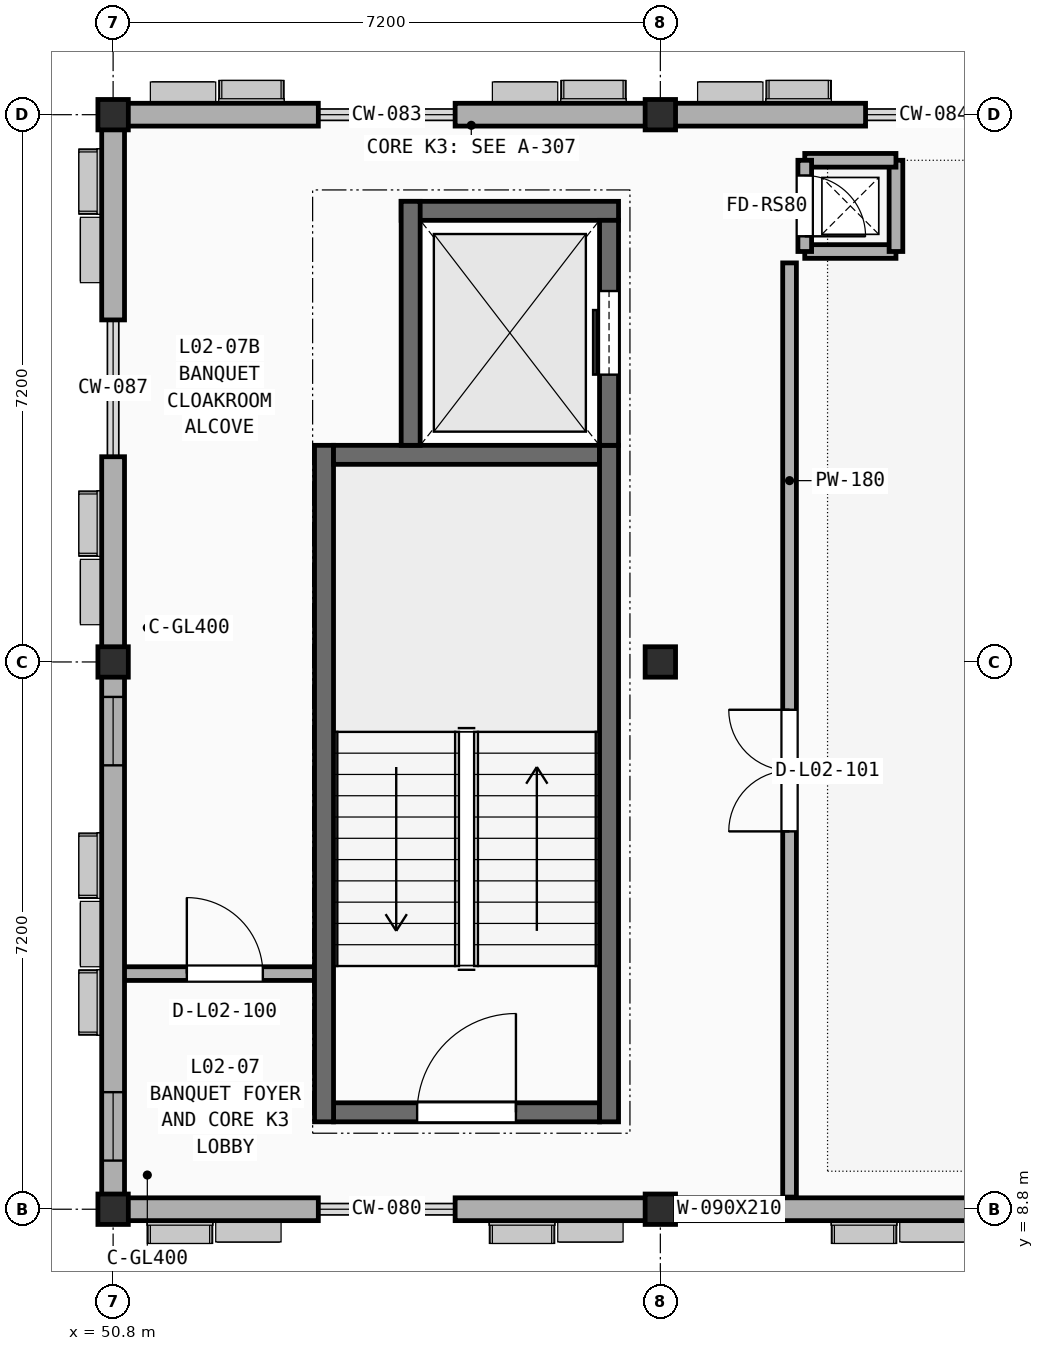
"""IFC4 building model, lengths in metres.
Left out: names, types, materials, properties, quantities, classifications, styles, units other than length and angle.
Written with IfcOpenShell. Run it as: python <this file> out.ifc"""

import sys

from ifc_helpers import new_model, si_unit, direction, frame, frame_2d, origin, origin_2d, place, context, subcontext, project, spatial, rectangle, extrude, element, fill, save


model = new_model("IFC4")
c1 = context("Model", 3, precision=1e-05, world=origin(), true_north=direction((0.0, 1.0)))
c2 = subcontext(c1, "Body", "Model", "MODEL_VIEW")
j1 = project(units=[si_unit("LENGTHUNIT", "METRE"), si_unit("PLANEANGLEUNIT", "RADIAN")], contexts=[c1])
p1 = place(None, origin())
s1 = spatial("IfcSite", under=j1, at=p1, CompositionType="ELEMENT")
p2 = place(p1, origin())
s2 = spatial("IfcBuilding", under=s1, at=p2, CompositionType="ELEMENT")
p3 = place(p2, frame((0.0, 0.0, 9.6)))
s3 = spatial("IfcBuildingStorey", under=s2, at=p3, CompositionType="ELEMENT", Elevation=9.6)
for number, where, z_axis, x_axis in (
    (1, (50.8, 8.8, 0.0), (0.0, 0.0, 1.0), (1.0, 0.0, 0.0)),
    (2, (50.8, 16.0, 0.0), (0.0, 0.0, 1.0), (1.0, 0.0, 0.0)),
    (3, (50.8, 23.2, 0.0), (0.0, 0.0, 1.0), (1.0, 0.0, 0.0)),
    (4, (58.0, 8.8, 0.0), (0.0, 0.0, 1.0), (1.0, 0.0, 0.0)),
    (5, (58.0, 16.0, 0.0), (0.0, 0.0, 1.0), (1.0, 0.0, 0.0)),
    (6, (58.0, 23.2, 0.0), (0.0, 0.0, 1.0), (1.0, 0.0, 0.0)),
):
    element("IfcColumn", number, at=place(p3, frame(where, z_axis=z_axis, x_axis=x_axis)), inside=s3, PredefinedType="COLUMN", context=c2, shape_type="SweptSolid", body=[
        extrude(rectangle(XDim=0.4, YDim=0.4, at=origin_2d()), origin(), (0.0, 0.0, 1.0), 4.2),
    ])
p4 = place(p3, frame((50.94, 11.9, 0.0), z_axis=(0.0, 0.0, 1.0), x_axis=(1.0, 0.0, 0.0)))
e7 = element("IfcWall", 7, at=p4, inside=s3, PredefinedType="PARTITIONING", context=c2, shape_type="SweptSolid", body=[
    extrude(rectangle(XDim=2.66, YDim=0.18, at=frame_2d((1.33, 0.0))), origin(), (0.0, 0.0, 1.0), 3.45),
])
p5 = place(p4, frame((0.83, 0.0, -0.01)))
e8 = element("IfcOpeningElement", 8, at=p5, cuts=e7, PredefinedType="OPENING", context=c2, shape_type="SweptSolid", body=[
    extrude(rectangle(XDim=1.0, YDim=2.16, at=frame_2d((0.5, 1.08))), frame((0.0, 0.1, 0.0), z_axis=(0.0, -1.0, 0.0), x_axis=(1.0, 0.0, 0.0)), (0.0, 0.0, 1.0), 0.2),
])
p6 = place(p3, frame((59.7, 8.96, 0.0), z_axis=(0.0, 0.0, 1.0), x_axis=(0.0, 1.0, 0.0)))
e9 = element("IfcWall", 9, at=p6, inside=s3, PredefinedType="PARTITIONING", context=c2, shape_type="SweptSolid", body=[
    extrude(rectangle(XDim=12.29, YDim=0.18, at=frame_2d((6.145, 0.0))), origin(), (0.0, 0.0, 1.0), 3.37),
])
p7 = place(p6, frame((4.811, 0.0, -0.01)))
e10 = element("IfcOpeningElement", 10, at=p7, cuts=e9, PredefinedType="OPENING", context=c2, shape_type="SweptSolid", body=[
    extrude(rectangle(XDim=1.6, YDim=2.21, at=frame_2d((0.8, 1.105))), frame((0.0, 0.1, 0.0), z_axis=(0.0, -1.0, 0.0), x_axis=(1.0, 0.0, 0.0)), (0.0, 0.0, 1.0), 0.2),
])
for number, where, z_axis, x_axis in (
    (11, (50.8, 8.8, 0.0), (0.0, 0.0, 1.0), (1.0, 0.0, 0.0)),
    (12, (55.3, 8.8, 0.0), (0.0, 0.0, 1.0), (1.0, 0.0, 0.0)),
):
    element("IfcWall", number, at=place(p3, frame(where, z_axis=z_axis, x_axis=x_axis)), inside=s3, PredefinedType="SOLIDWALL", context=c2, shape_type="SweptSolid", body=[
        extrude(rectangle(XDim=2.7, YDim=0.3, at=frame_2d((1.35, 0.0))), origin(), (0.0, 0.0, 1.0), 3.37),
    ])
p8 = place(p3, frame((58.0, 8.8, 0.0), z_axis=(0.0, 0.0, 1.0), x_axis=(1.0, 0.0, 0.0)))
e13 = element("IfcWall", 13, at=p8, inside=s3, PredefinedType="SOLIDWALL", context=c2, shape_type="SweptSolid", body=[
    extrude(rectangle(XDim=7.2, YDim=0.3, at=frame_2d((3.6, 0.0))), origin(), (0.0, 0.0, 1.0), 3.33),
])
p9 = place(p8, frame((0.46, 0.0, 0.85)))
e14 = element("IfcOpeningElement", 14, at=p9, cuts=e13, PredefinedType="OPENING", context=c2, shape_type="SweptSolid", body=[
    extrude(rectangle(XDim=0.9, YDim=2.1, at=frame_2d((0.45, 1.05))), frame((0.0, 0.16, 0.0), z_axis=(0.0, -1.0, 0.0), x_axis=(1.0, 0.0, 0.0)), (0.0, 0.0, 1.0), 0.32),
])
p10 = place(p8, frame((5.66, 0.0, 0.85)))
e15 = element("IfcOpeningElement", 15, at=p10, cuts=e13, PredefinedType="OPENING", context=c2, shape_type="SweptSolid", body=[
    extrude(rectangle(XDim=0.9, YDim=2.1, at=frame_2d((0.45, 1.05))), frame((0.0, 0.16, 0.0), z_axis=(0.0, -1.0, 0.0), x_axis=(1.0, 0.0, 0.0)), (0.0, 0.0, 1.0), 0.32),
])
for number, where, z_axis, x_axis in (
    (16, (58.0, 23.2, 0.0), (0.0, 0.0, 1.0), (-1.0, 0.0, 0.0)),
    (17, (53.5, 23.2, 0.0), (0.0, 0.0, 1.0), (-1.0, 0.0, 0.0)),
):
    element("IfcWall", number, at=place(p3, frame(where, z_axis=z_axis, x_axis=x_axis)), inside=s3, PredefinedType="SOLIDWALL", context=c2, shape_type="SweptSolid", body=[
        extrude(rectangle(XDim=2.7, YDim=0.3, at=frame_2d((1.35, 0.0))), origin(), (0.0, 0.0, 1.0), 3.37),
    ])
p11 = place(p3, frame((60.7, 23.2, 0.0), z_axis=(0.0, 0.0, 1.0), x_axis=(-1.0, 0.0, 0.0)))
e18 = element("IfcWall", 18, at=p11, inside=s3, PredefinedType="SOLIDWALL", context=c2, shape_type="SweptSolid", body=[
    extrude(rectangle(XDim=2.7, YDim=0.3, at=frame_2d((1.35, 0.0))), origin(), (0.0, 0.0, 1.0), 3.33),
])
p12 = place(p3, frame((50.8, 16.0, 0.0), z_axis=(0.0, 0.0, 1.0), x_axis=(0.0, -1.0, 0.0)))
e19 = element("IfcWall", 19, at=p12, inside=s3, PredefinedType="SOLIDWALL", context=c2, shape_type="SweptSolid", body=[
    extrude(rectangle(XDim=7.2, YDim=0.3, at=frame_2d((3.6, 0.0))), origin(), (0.0, 0.0, 1.0), 3.37),
])
p13 = place(p12, frame((0.46, 0.0, 0.85)))
e20 = element("IfcOpeningElement", 20, at=p13, cuts=e19, PredefinedType="OPENING", context=c2, shape_type="SweptSolid", body=[
    extrude(rectangle(XDim=0.9, YDim=2.1, at=frame_2d((0.45, 1.05))), frame((0.0, 0.16, 0.0), z_axis=(0.0, -1.0, 0.0), x_axis=(1.0, 0.0, 0.0)), (0.0, 0.0, 1.0), 0.32),
])
p14 = place(p12, frame((5.66, 0.0, 0.85)))
e21 = element("IfcOpeningElement", 21, at=p14, cuts=e19, PredefinedType="OPENING", context=c2, shape_type="SweptSolid", body=[
    extrude(rectangle(XDim=0.9, YDim=2.1, at=frame_2d((0.45, 1.05))), frame((0.0, 0.16, 0.0), z_axis=(0.0, -1.0, 0.0), x_axis=(1.0, 0.0, 0.0)), (0.0, 0.0, 1.0), 0.32),
])
for number, where, z_axis, x_axis in (
    (22, (50.8, 23.2, 0.0), (0.0, 0.0, 1.0), (0.0, -1.0, 0.0)),
    (23, (50.8, 18.7, 0.0), (0.0, 0.0, 1.0), (0.0, -1.0, 0.0)),
):
    element("IfcWall", number, at=place(p3, frame(where, z_axis=z_axis, x_axis=x_axis)), inside=s3, PredefinedType="SOLIDWALL", context=c2, shape_type="SweptSolid", body=[
        extrude(rectangle(XDim=2.7, YDim=0.3, at=frame_2d((1.35, 0.0))), origin(), (0.0, 0.0, 1.0), 3.37),
    ])
p15 = place(p3, frame((53.7, 10.075, 0.0), z_axis=(0.0, 0.0, 1.0), x_axis=(1.0, 0.0, 0.0)))
e24 = element("IfcWall", 24, at=p15, inside=s3, PredefinedType="SHEAR", context=c2, shape_type="SweptSolid", body=[
    extrude(rectangle(XDim=3.5, YDim=0.25, at=frame_2d((1.75, 0.0))), origin(), (0.0, 0.0, 1.0), 4.2),
])
p16 = place(p15, frame((1.1, 0.0, -0.01)))
e25 = element("IfcOpeningElement", 25, at=p16, cuts=e24, PredefinedType="OPENING", context=c2, shape_type="SweptSolid", body=[
    extrude(rectangle(XDim=1.3, YDim=2.16, at=frame_2d((0.65, 1.08))), frame((0.0, 0.135, 0.0), z_axis=(0.0, -1.0, 0.0), x_axis=(1.0, 0.0, 0.0)), (0.0, 0.0, 1.0), 0.27),
])
p17 = place(p3, frame((53.575, 9.95, 0.0), z_axis=(0.0, 0.0, 1.0), x_axis=(0.0, 1.0, 0.0)))
e26 = element("IfcWall", 26, at=p17, inside=s3, PredefinedType="SHEAR", context=c2, shape_type="SweptSolid", body=[
    extrude(rectangle(XDim=8.9, YDim=0.25, at=frame_2d((4.45, 0.0))), origin(), (0.0, 0.0, 1.0), 4.2),
])
p18 = place(p3, frame((57.2, 18.725, 0.0), z_axis=(0.0, 0.0, 1.0), x_axis=(-1.0, 0.0, 0.0)))
e27 = element("IfcWall", 27, at=p18, inside=s3, PredefinedType="SHEAR", context=c2, shape_type="SweptSolid", body=[
    extrude(rectangle(XDim=3.5, YDim=0.25, at=frame_2d((1.75, 0.0))), origin(), (0.0, 0.0, 1.0), 4.2),
])
p19 = place(p3, frame((57.325, 9.95, 0.0), z_axis=(0.0, 0.0, 1.0), x_axis=(0.0, 1.0, 0.0)))
e28 = element("IfcWall", 28, at=p19, inside=s3, PredefinedType="SHEAR", context=c2, shape_type="SweptSolid", body=[
    extrude(rectangle(XDim=8.9, YDim=0.25, at=frame_2d((4.45, 0.0))), origin(), (0.0, 0.0, 1.0), 4.2),
])
p20 = place(p3, frame((54.59, 21.935, 0.0), z_axis=(0.0, 0.0, 1.0), x_axis=(1.0, 0.0, 0.0)))
e29 = element("IfcWall", 29, at=p20, inside=s3, PredefinedType="SHEAR", context=c2, shape_type="SweptSolid", body=[
    extrude(rectangle(XDim=2.86, YDim=0.25, at=frame_2d((1.43, 0.0))), origin(), (0.0, 0.0, 1.0), 4.2),
])
p21 = place(p3, frame((57.325, 18.85, 0.0), z_axis=(0.0, 0.0, 1.0), x_axis=(0.0, 1.0, 0.0)))
e30 = element("IfcWall", 30, at=p21, inside=s3, PredefinedType="SHEAR", context=c2, shape_type="SweptSolid", body=[
    extrude(rectangle(XDim=2.96, YDim=0.25, at=frame_2d((1.48, 0.0))), origin(), (0.0, 0.0, 1.0), 4.2),
])
p22 = place(p21, frame((0.93, 0.0, -0.01)))
e31 = element("IfcOpeningElement", 31, at=p22, cuts=e30, PredefinedType="OPENING", context=c2, shape_type="SweptSolid", body=[
    extrude(rectangle(XDim=1.1, YDim=2.16, at=frame_2d((0.55, 1.08))), frame((0.0, 0.135, 0.0), z_axis=(0.0, -1.0, 0.0), x_axis=(1.0, 0.0, 0.0)), (0.0, 0.0, 1.0), 0.27),
])
p23 = place(p3, frame((54.715, 18.85, 0.0), z_axis=(0.0, 0.0, 1.0), x_axis=(0.0, 1.0, 0.0)))
e32 = element("IfcWall", 32, at=p23, inside=s3, PredefinedType="SHEAR", context=c2, shape_type="SweptSolid", body=[
    extrude(rectangle(XDim=3.21, YDim=0.25, at=frame_2d((1.605, 0.0))), origin(), (0.0, 0.0, 1.0), 4.2),
])
for number, where, z_axis, x_axis in (
    (33, (59.9, 21.4, 0.0), (0.0, 0.0, 1.0), (1.0, 0.0, 0.0)),
    (34, (61.1, 21.4, 0.0), (0.0, 0.0, 1.0), (0.0, 1.0, 0.0)),
    (35, (61.1, 22.6, 0.0), (0.0, 0.0, 1.0), (-1.0, 0.0, 0.0)),
):
    element("IfcWall", number, at=place(p3, frame(where, z_axis=z_axis, x_axis=x_axis)), inside=s3, PredefinedType="SOLIDWALL", context=c2, shape_type="SweptSolid", body=[
        extrude(rectangle(XDim=1.2, YDim=0.18, at=frame_2d((0.6, 0.0))), origin(), (0.0, 0.0, 1.0), 3.97),
    ])
p24 = place(p3, frame((59.9, 22.6, 0.0), z_axis=(0.0, 0.0, 1.0), x_axis=(0.0, -1.0, 0.0)))
e36 = element("IfcWall", 36, at=p24, inside=s3, PredefinedType="SOLIDWALL", context=c2, shape_type="SweptSolid", body=[
    extrude(rectangle(XDim=1.2, YDim=0.18, at=frame_2d((0.6, 0.0))), origin(), (0.0, 0.0, 1.0), 3.97),
])
p25 = place(p24, frame((0.2, 0.0, -0.01)))
e37 = element("IfcOpeningElement", 37, at=p25, cuts=e36, PredefinedType="OPENING", context=c2, shape_type="SweptSolid", body=[
    extrude(rectangle(XDim=0.8, YDim=2.06, at=frame_2d((0.4, 1.03))), frame((0.0, 0.1, 0.0), z_axis=(0.0, -1.0, 0.0), x_axis=(1.0, 0.0, 0.0)), (0.0, 0.0, 1.0), 0.2),
])
p26 = place(p5, frame((0.0, 0.0, 0.01)))
e38 = element("IfcDoor", 38, at=p26, inside=s3, OperationType="SINGLE_SWING_LEFT", PredefinedType="DOOR", context=c2, shape_type="SweptSolid", body=[
    extrude(rectangle(XDim=1.0, YDim=2.15, at=frame_2d((0.5, 1.075))), frame((0.0, 0.025, 0.0), z_axis=(0.0, -1.0, 0.0), x_axis=(1.0, 0.0, 0.0)), (0.0, 0.0, 1.0), 0.05),
])
fill(e8, e38)
p27 = place(p7, frame((0.0, 0.0, 0.01)))
e39 = element("IfcDoor", 39, at=p27, inside=s3, OperationType="DOUBLE_SWING_LEFT", PredefinedType="DOOR", context=c2, shape_type="SweptSolid", body=[
    extrude(rectangle(XDim=1.6, YDim=2.2, at=frame_2d((0.8, 1.1))), frame((0.0, 0.025, 0.0), z_axis=(0.0, -1.0, 0.0), x_axis=(1.0, 0.0, 0.0)), (0.0, 0.0, 1.0), 0.05),
])
fill(e10, e39)
p28 = place(p9, origin())
e40 = element("IfcWindow", 40, at=p28, inside=s3, PartitioningType="SINGLE_PANEL", PredefinedType="WINDOW", context=c2, shape_type="SweptSolid", body=[
    extrude(rectangle(XDim=0.9, YDim=2.1, at=frame_2d((0.45, 1.05))), frame((0.0, 0.03, 0.0), z_axis=(0.0, -1.0, 0.0), x_axis=(1.0, 0.0, 0.0)), (0.0, 0.0, 1.0), 0.06),
])
fill(e14, e40)
p29 = place(p13, origin())
e41 = element("IfcWindow", 41, at=p29, inside=s3, PartitioningType="SINGLE_PANEL", PredefinedType="WINDOW", context=c2, shape_type="SweptSolid", body=[
    extrude(rectangle(XDim=0.9, YDim=2.1, at=frame_2d((0.45, 1.05))), frame((0.0, 0.03, 0.0), z_axis=(0.0, -1.0, 0.0), x_axis=(1.0, 0.0, 0.0)), (0.0, 0.0, 1.0), 0.06),
])
fill(e20, e41)
p30 = place(p14, origin())
e42 = element("IfcWindow", 42, at=p30, inside=s3, PartitioningType="SINGLE_PANEL", PredefinedType="WINDOW", context=c2, shape_type="SweptSolid", body=[
    extrude(rectangle(XDim=0.9, YDim=2.1, at=frame_2d((0.45, 1.05))), frame((0.0, 0.03, 0.0), z_axis=(0.0, -1.0, 0.0), x_axis=(1.0, 0.0, 0.0)), (0.0, 0.0, 1.0), 0.06),
])
fill(e21, e42)
p31 = place(p16, frame((0.0, 0.0, 0.01)))
e43 = element("IfcDoor", 43, at=p31, inside=s3, OperationType="SINGLE_SWING_RIGHT", PredefinedType="DOOR", context=c2, shape_type="SweptSolid", body=[
    extrude(rectangle(XDim=1.3, YDim=2.15, at=frame_2d((0.65, 1.075))), frame((0.0, 0.025, 0.0), z_axis=(0.0, -1.0, 0.0), x_axis=(1.0, 0.0, 0.0)), (0.0, 0.0, 1.0), 0.05),
])
fill(e25, e43)
p32 = place(p22, frame((0.0, 0.0, 0.01)))
e44 = element("IfcDoor", 44, at=p32, inside=s3, OperationType="SLIDING_TO_LEFT", PredefinedType="DOOR", context=c2, shape_type="SweptSolid", body=[
    extrude(rectangle(XDim=1.1, YDim=2.15, at=frame_2d((0.55, 1.075))), frame((0.0, 0.025, 0.0), z_axis=(0.0, -1.0, 0.0), x_axis=(1.0, 0.0, 0.0)), (0.0, 0.0, 1.0), 0.05),
])
fill(e31, e44)
p33 = place(p25, frame((0.0, 0.0, 0.01)))
e45 = element("IfcDoor", 45, at=p33, inside=s3, OperationType="SINGLE_SWING_RIGHT", PredefinedType="DOOR", context=c2, shape_type="SweptSolid", body=[
    extrude(rectangle(XDim=0.8, YDim=2.05, at=frame_2d((0.4, 1.025))), frame((0.0, 0.025, 0.0), z_axis=(0.0, -1.0, 0.0), x_axis=(1.0, 0.0, 0.0)), (0.0, 0.0, 1.0), 0.05),
])
fill(e37, e45)
save(model, sys.argv[1])
